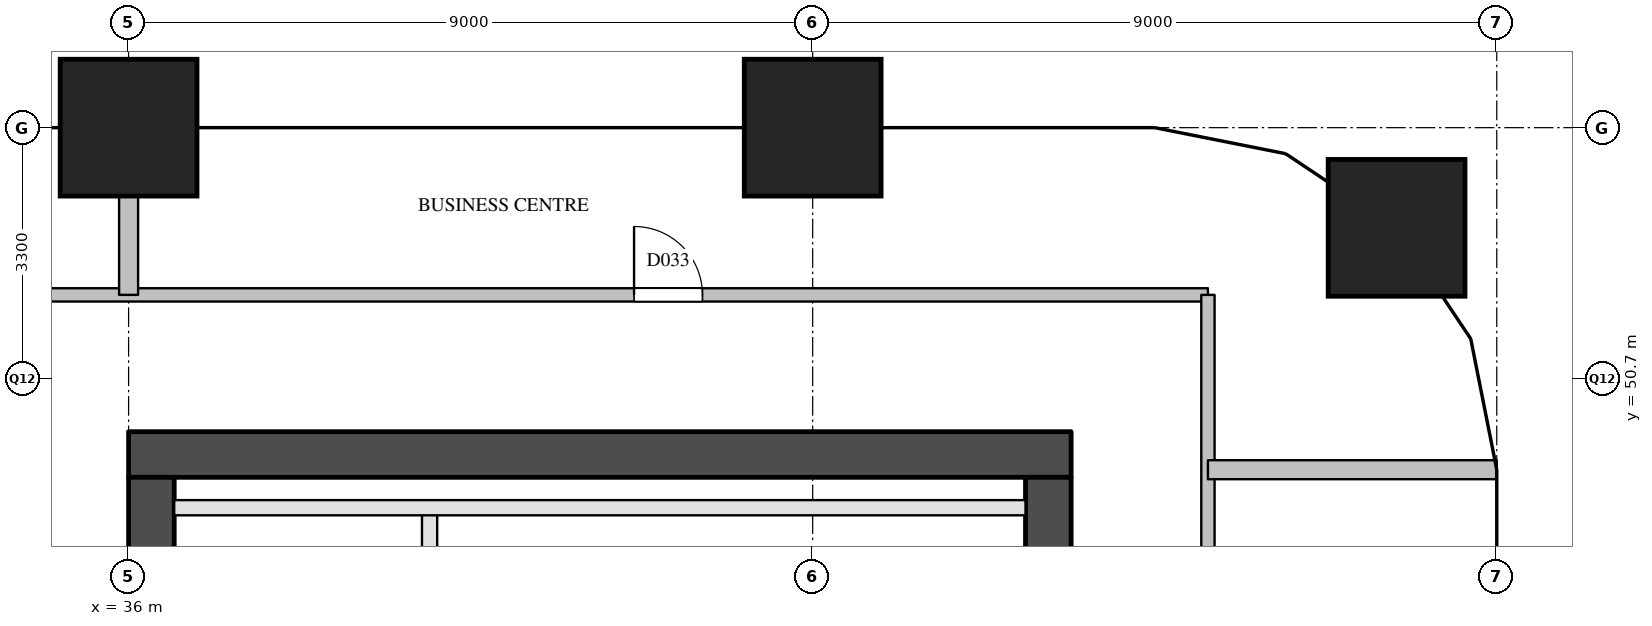
"""IFC4 building model, lengths in metres.
Left out: names, types, materials, properties, quantities, classifications, styles, units other than length and angle.
Written with IfcOpenShell. Run it as: python <this file> out.ifc"""

import sys

from ifc_helpers import new_model, si_unit, direction, frame, frame_2d, origin, origin_2d, place, context, subcontext, project, spatial, rectangle, extrude, element, fill, save


model = new_model("IFC4")
c1 = context("Model", 3, precision=1e-05, world=origin(), true_north=direction((0.0, 1.0)))
c2 = subcontext(c1, "Body", "Model", "MODEL_VIEW")
j1 = project(units=[si_unit("LENGTHUNIT", "METRE"), si_unit("PLANEANGLEUNIT", "RADIAN")], contexts=[c1])
p1 = place(None, origin())
s1 = spatial("IfcSite", under=j1, at=p1, CompositionType="ELEMENT")
p2 = place(p1, origin())
s2 = spatial("IfcBuilding", under=s1, at=p2, CompositionType="ELEMENT")
p3 = place(p2, frame((0.0, 0.0, 100.6)))
s3 = spatial("IfcBuildingStorey", under=s2, at=p3, CompositionType="ELEMENT", Elevation=100.6)
for number, where, z_axis, x_axis in (
    (1, (36.0, 54.0, 0.0), (0.0, 0.0, 1.0), (1.0, 0.0, 0.0)),
    (2, (45.0, 54.0, 0.0), (0.0, 0.0, 1.0), (1.0, 0.0, 0.0)),
    (3, (52.682, 52.682, 0.0), (0.0, 0.0, 1.0), (1.0, 0.0, 0.0)),
):
    element("IfcColumn", number, at=place(p3, frame(where, z_axis=z_axis, x_axis=x_axis)), inside=s3, PredefinedType="COLUMN", context=c2, shape_type="SweptSolid", body=[
        extrude(rectangle(XDim=1.8, YDim=1.8, at=origin_2d()), origin(), (0.0, 0.0, 1.0), 3.8),
    ])
p4 = place(p3, frame((36.0, 49.7, 0.0), z_axis=(0.0, 0.0, 1.0), x_axis=(1.0, 0.0, 0.0)))
e4 = element("IfcWall", 4, at=p4, inside=s3, PredefinedType="SHEAR", context=c2, shape_type="SweptSolid", body=[
    extrude(rectangle(XDim=12.4, YDim=0.6, at=frame_2d((6.2, 0.0))), origin(), (0.0, 0.0, 1.0), 3.5),
])
p5 = place(p3, frame((36.3, 29.1, 0.0), z_axis=(0.0, 0.0, 1.0), x_axis=(0.0, 1.0, 0.0)))
e5 = element("IfcWall", 5, at=p5, inside=s3, PredefinedType="SHEAR", context=c2, shape_type="SweptSolid", body=[
    extrude(rectangle(XDim=20.3, YDim=0.6, at=frame_2d((10.15, 0.0))), origin(), (0.0, 0.0, 1.0), 3.5),
])
p6 = place(p5, frame((3.6, 0.0, 0.0)))
e6 = element("IfcOpeningElement", 6, at=p6, cuts=e5, PredefinedType="OPENING", context=c2, shape_type="SweptSolid", body=[
    extrude(rectangle(XDim=1.8, YDim=2.1, at=frame_2d((0.9, 1.05))), frame((0.0, 0.31, 0.0), z_axis=(0.0, -1.0, 0.0), x_axis=(1.0, 0.0, 0.0)), (0.0, 0.0, 1.0), 0.62),
])
p7 = place(p5, frame((16.4, 0.0, 0.0)))
e7 = element("IfcOpeningElement", 7, at=p7, cuts=e5, PredefinedType="OPENING", context=c2, shape_type="SweptSolid", body=[
    extrude(rectangle(XDim=1.0, YDim=2.1, at=frame_2d((0.5, 1.05))), frame((0.0, 0.31, 0.0), z_axis=(0.0, -1.0, 0.0), x_axis=(1.0, 0.0, 0.0)), (0.0, 0.0, 1.0), 0.62),
])
p8 = place(p3, frame((48.1, 29.1, 0.0), z_axis=(0.0, 0.0, 1.0), x_axis=(0.0, 1.0, 0.0)))
e8 = element("IfcWall", 8, at=p8, inside=s3, PredefinedType="SHEAR", context=c2, shape_type="SweptSolid", body=[
    extrude(rectangle(XDim=20.3, YDim=0.6, at=frame_2d((10.15, 0.0))), origin(), (0.0, 0.0, 1.0), 3.5),
])
p9 = place(p8, frame((12.5, 0.0, 0.0)))
e9 = element("IfcOpeningElement", 9, at=p9, cuts=e8, PredefinedType="OPENING", context=c2, shape_type="SweptSolid", body=[
    extrude(rectangle(XDim=0.7, YDim=2.1, at=frame_2d((0.35, 1.05))), frame((0.0, 0.31, 0.0), z_axis=(0.0, -1.0, 0.0), x_axis=(1.0, 0.0, 0.0)), (0.0, 0.0, 1.0), 0.62),
])
p10 = place(p8, frame((3.9, 0.0, 0.0)))
e10 = element("IfcOpeningElement", 10, at=p10, cuts=e8, PredefinedType="OPENING", context=c2, shape_type="SweptSolid", body=[
    extrude(rectangle(XDim=1.8, YDim=2.1, at=frame_2d((0.9, 1.05))), frame((0.0, 0.31, 0.0), z_axis=(0.0, -1.0, 0.0), x_axis=(1.0, 0.0, 0.0)), (0.0, 0.0, 1.0), 0.62),
])
p11 = place(p3, frame((39.96, 46.8, 0.0), z_axis=(0.0, 0.0, 1.0), x_axis=(0.0, 1.0, 0.0)))
e11 = element("IfcWall", 11, at=p11, inside=s3, PredefinedType="PARTITIONING", context=c2, shape_type="SweptSolid", body=[
    extrude(rectangle(XDim=2.2, YDim=0.2, at=frame_2d((1.1, 0.0))), origin(), (0.0, 0.0, 1.0), 3.5),
])
p12 = place(p3, frame((36.6, 49.0, 0.0), z_axis=(0.0, 0.0, 1.0), x_axis=(1.0, 0.0, 0.0)))
e12 = element("IfcWall", 12, at=p12, inside=s3, PredefinedType="PARTITIONING", context=c2, shape_type="SweptSolid", body=[
    extrude(rectangle(XDim=11.2, YDim=0.2, at=frame_2d((5.6, 0.0))), origin(), (0.0, 0.0, 1.0), 3.5),
])
p13 = place(p3, frame((34.2, 51.8, 0.0), z_axis=(0.0, 0.0, 1.0), x_axis=(1.0, 0.0, 0.0)))
e13 = element("IfcWall", 13, at=p13, inside=s3, PredefinedType="PARTITIONING", context=c2, shape_type="SweptSolid", body=[
    extrude(rectangle(XDim=16.0, YDim=0.175, at=frame_2d((8.0, 0.0))), origin(), (0.0, 0.0, 1.0), 3.5),
])
p14 = place(p13, frame((8.45, 0.0, 0.0)))
e14 = element("IfcOpeningElement", 14, at=p14, cuts=e13, PredefinedType="OPENING", context=c2, shape_type="SweptSolid", body=[
    extrude(rectangle(XDim=0.9, YDim=2.1, at=frame_2d((0.45, 1.05))), frame((0.0, 0.097, 0.0), z_axis=(0.0, -1.0, 0.0), x_axis=(1.0, 0.0, 0.0)), (0.0, 0.0, 1.0), 0.195),
])
p15 = place(p3, frame((50.2, 26.7, 0.0), z_axis=(0.0, 0.0, 1.0), x_axis=(0.0, 1.0, 0.0)))
e15 = element("IfcWall", 15, at=p15, inside=s3, PredefinedType="PARTITIONING", context=c2, shape_type="SweptSolid", body=[
    extrude(rectangle(XDim=25.1, YDim=0.175, at=frame_2d((12.55, 0.0))), origin(), (0.0, 0.0, 1.0), 2.5),
])
p16 = place(p15, frame((4.2, 0.0, 0.0)))
e16 = element("IfcOpeningElement", 16, at=p16, cuts=e15, PredefinedType="OPENING", context=c2, shape_type="SweptSolid", body=[
    extrude(rectangle(XDim=0.9, YDim=2.1, at=frame_2d((0.45, 1.05))), frame((0.0, 0.097, 0.0), z_axis=(0.0, -1.0, 0.0), x_axis=(1.0, 0.0, 0.0)), (0.0, 0.0, 1.0), 0.195),
])
p17 = place(p15, frame((15.6, 0.0, 0.0)))
e17 = element("IfcOpeningElement", 17, at=p17, cuts=e15, PredefinedType="OPENING", context=c2, shape_type="SweptSolid", body=[
    extrude(rectangle(XDim=0.9, YDim=2.1, at=frame_2d((0.45, 1.05))), frame((0.0, 0.097, 0.0), z_axis=(0.0, -1.0, 0.0), x_axis=(1.0, 0.0, 0.0)), (0.0, 0.0, 1.0), 0.195),
])
p18 = place(p3, frame((50.2, 49.5, 0.0), z_axis=(0.0, 0.0, 1.0), x_axis=(1.0, 0.0, 0.0)))
e18 = element("IfcWall", 18, at=p18, inside=s3, PredefinedType="PARTITIONING", context=c2, shape_type="SweptSolid", body=[
    extrude(rectangle(XDim=3.8, YDim=0.25, at=frame_2d((1.9, 0.0))), origin(), (0.0, 0.0, 1.0), 2.5),
])
p19 = place(p3, frame((36.0, 51.8, 0.0), z_axis=(0.0, 0.0, 1.0), x_axis=(0.0, 1.0, 0.0)))
e19 = element("IfcWall", 19, at=p19, inside=s3, PredefinedType="PARTITIONING", context=c2, shape_type="SweptSolid", body=[
    extrude(rectangle(XDim=2.2, YDim=0.25, at=frame_2d((1.1, 0.0))), origin(), (0.0, 0.0, 1.0), 3.5),
])
p20 = place(p14, origin())
e20 = element("IfcDoor", 20, at=p20, inside=s3, OperationType="SINGLE_SWING_LEFT", PredefinedType="DOOR", context=c2, shape_type="SweptSolid", body=[
    extrude(rectangle(XDim=0.9, YDim=2.1, at=frame_2d((0.45, 1.05))), frame((0.0, 0.025, 0.0), z_axis=(0.0, -1.0, 0.0), x_axis=(1.0, 0.0, 0.0)), (0.0, 0.0, 1.0), 0.05),
])
fill(e14, e20)
save(model, sys.argv[1])
